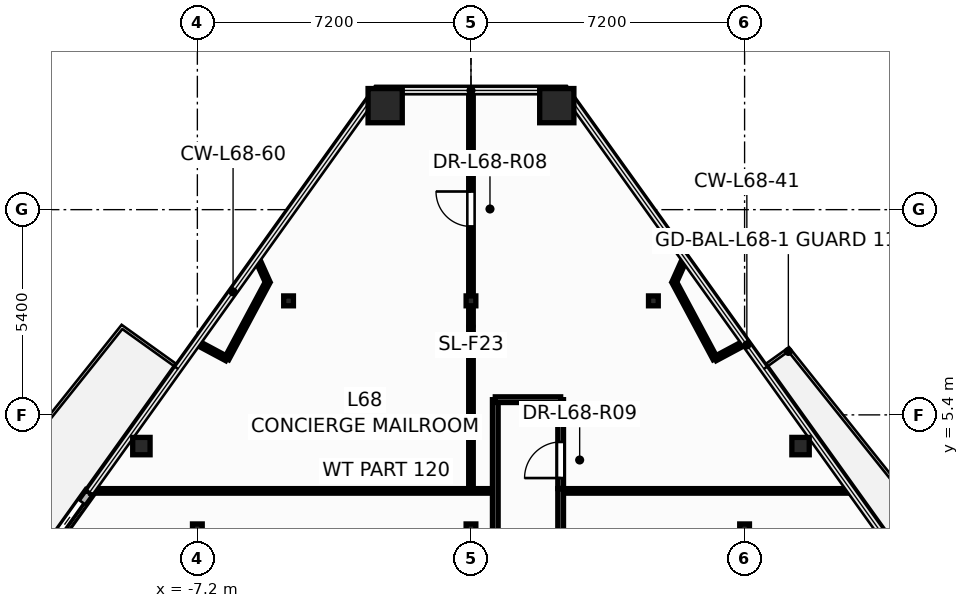
"""IFC4 building model, lengths in metres.
Left out: names, types, materials, properties, quantities, classifications, styles, units other than length and angle.
Written with IfcOpenShell. Run it as: python <this file> out.ifc"""

import sys

from ifc_helpers import new_model, si_unit, direction, frame, frame_2d, origin, origin_2d, place, context, subcontext, project, spatial, rectangle, hollow_rectangle, hollow_circle, i_section, extrude, element, fill, save


model = new_model("IFC4")
c1 = context("Model", 3, precision=1e-05, world=origin(), true_north=direction((0.0, 1.0)))
c2 = subcontext(c1, "Body", "Model", "MODEL_VIEW")
j1 = project(units=[si_unit("LENGTHUNIT", "METRE"), si_unit("PLANEANGLEUNIT", "RADIAN")], contexts=[c1])
p1 = place(None, origin())
s1 = spatial("IfcSite", under=j1, at=p1, CompositionType="ELEMENT")
p2 = place(p1, origin())
s2 = spatial("IfcBuilding", under=s1, at=p2, CompositionType="ELEMENT")
p3 = place(p2, frame((0.0, 0.0, 259.8)))
s3 = spatial("IfcBuildingStorey", under=s2, at=p3, CompositionType="ELEMENT", Elevation=259.8)
for number, where, z_axis, x_axis in (
    (1, (2.258, 13.537, 0.0), (0.0, 0.0, 1.0), (1.0, 0.0, 0.0)),
    (2, (-2.258, 13.537, 0.0), (0.0, 0.0, 1.0), (1.0, 0.0, 0.0)),
):
    element("IfcColumn", number, at=place(p3, frame(where, z_axis=z_axis, x_axis=x_axis)), inside=s3, PredefinedType="COLUMN", context=c2, shape_type="SweptSolid", body=[
        extrude(hollow_rectangle(XDim=0.9, YDim=0.9, WallThickness=0.04, at=origin_2d()), origin(), (0.0, 0.0, 1.0), 3.6),
    ])
for number, where, z_axis, x_axis in (
    (3, (8.673, 4.579, 0.0), (0.0, 0.0, 1.0), (1.0, 0.0, 0.0)),
    (4, (-8.673, 4.579, 0.0), (0.0, 0.0, 1.0), (1.0, 0.0, 0.0)),
):
    element("IfcColumn", number, at=place(p3, frame(where, z_axis=z_axis, x_axis=x_axis)), inside=s3, PredefinedType="COLUMN", context=c2, shape_type="SweptSolid", body=[
        extrude(hollow_circle(Radius=0.229, WallThickness=0.016, at=origin_2d()), origin(), (0.0, 0.0, 1.0), 3.6),
    ])
for number, where, z_axis, x_axis in (
    (5, (-7.2, 2.4, 0.0), (0.0, 0.0, 1.0), (1.0, 0.0, 0.0)),
    (6, (0.0, 2.4, 0.0), (0.0, 0.0, 1.0), (1.0, 0.0, 0.0)),
    (7, (7.2, 2.4, 0.0), (0.0, 0.0, 1.0), (1.0, 0.0, 0.0)),
    (8, (-4.8, 8.4, 0.0), (0.0, 0.0, 1.0), (1.0, 0.0, 0.0)),
    (9, (0.0, 8.4, 0.0), (0.0, 0.0, 1.0), (1.0, 0.0, 0.0)),
    (10, (4.8, 8.4, 0.0), (0.0, 0.0, 1.0), (1.0, 0.0, 0.0)),
):
    element("IfcColumn", number, at=place(p3, frame(where, z_axis=z_axis, x_axis=x_axis)), inside=s3, PredefinedType="COLUMN", context=c2, shape_type="SweptSolid", body=[
        extrude(i_section(OverallWidth=0.256, OverallDepth=0.26, WebThickness=0.01, FlangeThickness=0.017, at=origin_2d()), origin(), (0.0, 0.0, 1.0), 3.6),
    ])
p4 = place(p3, frame((-10.039, 3.357, -0.015), z_axis=(0.0, 0.0, 1.0), x_axis=(-0.58216589686, -0.813070026832, 0.0)))
e11 = element("IfcWall", 11, at=p4, inside=s3, PredefinedType="STANDARD", context=c2, shape_type="SweptSolid", body=[
    extrude(rectangle(XDim=2.14, YDim=0.24, at=frame_2d((1.07, 0.0))), origin(), (0.0, 0.0, 1.0), 2.878),
])
p5 = place(p4, frame((0.32, 0.0, 0.015)))
e12 = element("IfcOpeningElement", 12, at=p5, cuts=e11, PredefinedType="OPENING", context=c2, shape_type="SweptSolid", body=[
    extrude(rectangle(XDim=1.506, YDim=2.204, at=frame_2d((0.75, 1.102))), frame((0.0, 0.13, 0.0), z_axis=(0.0, -1.0, 0.0), x_axis=(1.0, 0.0, 0.0)), (0.0, 0.0, 1.0), 0.26),
])
p6 = place(p3, frame((0.0, 3.4, 0.0), z_axis=(0.0, 0.0, 1.0), x_axis=(0.0, 1.0, 0.0)))
e13 = element("IfcWall", 13, at=p6, inside=s3, PredefinedType="PARTITIONING", context=c2, shape_type="SweptSolid", body=[
    extrude(rectangle(XDim=10.537, YDim=0.12, at=frame_2d((5.269, 0.0))), origin(), (0.0, 0.0, 1.0), 2.32),
])
p7 = place(p6, frame((6.958, 0.0, 0.0)))
e14 = element("IfcOpeningElement", 14, at=p7, cuts=e13, PredefinedType="OPENING", context=c2, shape_type="SweptSolid", body=[
    extrude(rectangle(XDim=0.926, YDim=2.104, at=frame_2d((0.46, 1.052))), frame((0.0, 0.07, 0.0), z_axis=(0.0, -1.0, 0.0), x_axis=(1.0, 0.0, 0.0)), (0.0, 0.0, 1.0), 0.14),
])
p8 = place(p3, frame((-10.009, 3.4, 0.0), z_axis=(0.0, 0.0, 1.0), x_axis=(1.0, 0.0, 0.0)))
e15 = element("IfcWall", 15, at=p8, inside=s3, PredefinedType="PARTITIONING", context=c2, shape_type="SweptSolid", body=[
    extrude(rectangle(XDim=10.649, YDim=0.12, at=frame_2d((5.324, 0.0))), origin(), (0.0, 0.0, 1.0), 2.32),
])
p9 = place(p3, frame((2.36, 3.4, 0.0), z_axis=(0.0, 0.0, 1.0), x_axis=(1.0, 0.0, 0.0)))
e16 = element("IfcWall", 16, at=p9, inside=s3, PredefinedType="PARTITIONING", context=c2, shape_type="SweptSolid", body=[
    extrude(rectangle(XDim=7.649, YDim=0.12, at=frame_2d((3.824, 0.0))), origin(), (0.0, 0.0, 1.0), 2.32),
])
p10 = place(p3, frame((2.36, -2.76, 0.0), z_axis=(0.0, 0.0, 1.0), x_axis=(0.0, 1.0, 0.0)))
e17 = element("IfcWall", 17, at=p10, inside=s3, PredefinedType="PARTITIONING", context=c2, shape_type="SweptSolid", body=[
    extrude(rectangle(XDim=6.22, YDim=0.15, at=frame_2d((3.11, 0.0))), origin(), (0.0, 0.0, 1.0), 2.32),
])
p11 = place(p3, frame((0.64, -2.76, 0.0), z_axis=(0.0, 0.0, 1.0), x_axis=(0.0, 1.0, 0.0)))
e18 = element("IfcWall", 18, at=p11, inside=s3, PredefinedType="PARTITIONING", context=c2, shape_type="SweptSolid", body=[
    extrude(rectangle(XDim=8.56, YDim=0.15, at=frame_2d((4.28, 0.0))), origin(), (0.0, 0.0, 1.0), 2.32),
])
p12 = place(p3, frame((2.36, 3.462, 0.0), z_axis=(0.0, 0.0, 1.0), x_axis=(0.0, 1.0, 0.0)))
e19 = element("IfcWall", 19, at=p12, inside=s3, PredefinedType="PARTITIONING", context=c2, shape_type="SweptSolid", body=[
    extrude(rectangle(XDim=2.338, YDim=0.15, at=frame_2d((1.169, 0.0))), origin(), (0.0, 0.0, 1.0), 2.964),
])
p13 = place(p12, frame((0.276, 0.0, 0.0)))
e20 = element("IfcOpeningElement", 20, at=p13, cuts=e19, PredefinedType="OPENING", context=c2, shape_type="SweptSolid", body=[
    extrude(rectangle(XDim=0.956, YDim=2.104, at=frame_2d((0.475, 1.052))), frame((0.0, 0.085, 0.0), z_axis=(0.0, -1.0, 0.0), x_axis=(1.0, 0.0, 0.0)), (0.0, 0.0, 1.0), 0.17),
])
for number, where, z_axis, x_axis in (
    (21, (-5.35, 8.89, 0.0), (0.0, 0.0, 1.0), (-0.472, -0.882, 0.0)),
    (22, (6.426, 6.879, 0.0), (0.0, 0.0, 1.0), (-0.472, 0.882, 0.0)),
):
    element("IfcWall", number, at=place(p3, frame(where, z_axis=z_axis, x_axis=x_axis)), inside=s3, PredefinedType="PARTITIONING", context=c2, shape_type="SweptSolid", body=[
        extrude(rectangle(XDim=2.281, YDim=0.12, at=frame_2d((1.141, 0.0))), origin(), (0.0, 0.0, 1.0), 2.32),
    ])
p14 = place(p3, frame((0.64, 5.8, 0.0), z_axis=(0.0, 0.0, 1.0), x_axis=(1.0, 0.0, 0.0)))
e23 = element("IfcWall", 23, at=p14, inside=s3, PredefinedType="PARTITIONING", context=c2, shape_type="SweptSolid", body=[
    extrude(rectangle(XDim=1.72, YDim=0.15, at=frame_2d((0.86, 0.0))), origin(), (0.0, 0.0, 1.0), 2.964),
])
for number, where, z_axis, x_axis in (
    (24, (-6.426, 6.879, 0.0), (0.0, 0.0, 1.0), (-0.882, 0.472, 0.0)),
    (25, (7.206, 7.297, 0.0), (0.0, 0.0, 1.0), (-0.882, -0.472, 0.0)),
):
    element("IfcWall", number, at=place(p3, frame(where, z_axis=z_axis, x_axis=x_axis)), inside=s3, PredefinedType="PARTITIONING", context=c2, shape_type="SweptSolid", body=[
        extrude(rectangle(XDim=0.885, YDim=0.12, at=frame_2d((0.442, 0.0))), origin(), (0.0, 0.0, 1.0), 2.32),
    ])
for number, where, z_axis, x_axis in (
    (26, (-5.625, 9.504, 0.0), (0.0, 0.0, 1.0), (0.41, -0.912, 0.0)),
    (27, (5.35, 8.89, 0.0), (0.0, 0.0, 1.0), (0.41, 0.912, 0.0)),
):
    element("IfcWall", number, at=place(p3, frame(where, z_axis=z_axis, x_axis=x_axis)), inside=s3, PredefinedType="PARTITIONING", context=c2, shape_type="SweptSolid", body=[
        extrude(rectangle(XDim=0.673, YDim=0.12, at=frame_2d((0.336, 0.0))), origin(), (0.0, 0.0, 1.0), 2.863),
    ])
p15 = place(p5, origin())
e28 = element("IfcDoor", 28, at=p15, inside=s3, OperationType="SLIDING_TO_RIGHT", PredefinedType="DOOR", context=c2, shape_type="SweptSolid", body=[
    extrude(rectangle(XDim=1.5, YDim=2.2, at=frame_2d((0.75, 1.1))), frame((0.0, 0.025, 0.0), z_axis=(0.0, -1.0, 0.0), x_axis=(1.0, 0.0, 0.0)), (0.0, 0.0, 1.0), 0.05),
])
fill(e12, e28)
p16 = place(p7, origin())
e29 = element("IfcDoor", 29, at=p16, inside=s3, OperationType="SINGLE_SWING_RIGHT", PredefinedType="DOOR", context=c2, shape_type="SweptSolid", body=[
    extrude(rectangle(XDim=0.92, YDim=2.1, at=frame_2d((0.46, 1.05))), frame((0.0, 0.025, 0.0), z_axis=(0.0, -1.0, 0.0), x_axis=(1.0, 0.0, 0.0)), (0.0, 0.0, 1.0), 0.05),
])
fill(e14, e29)
p17 = place(p13, origin())
e30 = element("IfcDoor", 30, at=p17, inside=s3, OperationType="SINGLE_SWING_LEFT", PredefinedType="DOOR", context=c2, shape_type="SweptSolid", body=[
    extrude(rectangle(XDim=0.95, YDim=2.1, at=frame_2d((0.475, 1.05))), frame((0.0, 0.025, 0.0), z_axis=(0.0, -1.0, 0.0), x_axis=(1.0, 0.0, 0.0)), (0.0, 0.0, 1.0), 0.05),
])
fill(e20, e30)
save(model, sys.argv[1])
